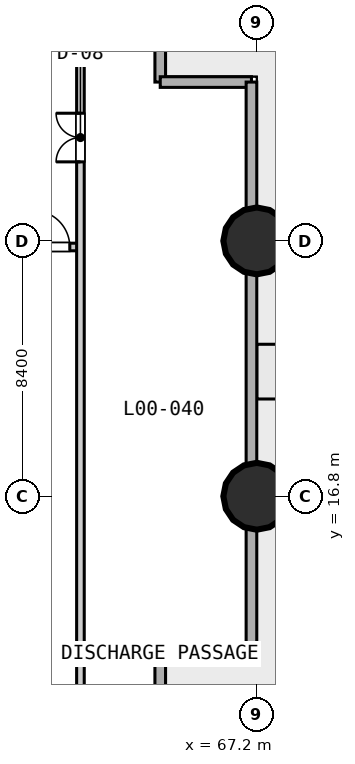
"""IFC4 building model, lengths in metres.
Left out: names, types, materials, properties, quantities, classifications, styles, units other than length and angle.
Written with IfcOpenShell. Run it as: python <this file> out.ifc"""

import sys

from ifc_helpers import new_model, si_unit, direction, frame, frame_2d, origin, origin_2d, place, context, subcontext, project, spatial, rectangle, circle, extrude, element, fill, save


model = new_model("IFC4")
c1 = context("Model", 3, precision=1e-05, world=origin(), true_north=direction((0.0, 1.0)))
c2 = subcontext(c1, "Body", "Model", "MODEL_VIEW")
j1 = project(units=[si_unit("LENGTHUNIT", "METRE"), si_unit("PLANEANGLEUNIT", "RADIAN")], contexts=[c1])
p1 = place(None, origin())
s1 = spatial("IfcSite", under=j1, at=p1, CompositionType="ELEMENT")
p2 = place(p1, origin())
s2 = spatial("IfcBuilding", under=s1, at=p2, CompositionType="ELEMENT")
p3 = place(p2, origin())
s3 = spatial("IfcBuildingStorey", under=s2, at=p3, CompositionType="ELEMENT", Elevation=0.0)
for number, where, z_axis, x_axis in (
    (1, (67.2, 16.8, 0.0), (0.0, 0.0, 1.0), (1.0, 0.0, 0.0)),
    (2, (67.2, 25.2, 0.0), (0.0, 0.0, 1.0), (1.0, 0.0, 0.0)),
):
    element("IfcColumn", number, at=place(p3, frame(where, z_axis=z_axis, x_axis=x_axis)), inside=s3, PredefinedType="USERDEFINED", context=c2, shape_type="SweptSolid", body=[
        extrude(circle(Radius=1.1, at=origin_2d()), origin(), (0.0, 0.0, 1.0), 6.0),
    ])
for number, where, z_axis, x_axis in (
    (3, (64.025, 33.425, 0.0), (0.0, 0.0, 1.0), (0.0, -1.0, 0.0)),
    (4, (64.025, 30.425, 0.0), (0.0, 0.0, 1.0), (1.0, 0.0, 0.0)),
):
    element("IfcWall", number, at=place(p3, frame(where, z_axis=z_axis, x_axis=x_axis)), inside=s3, PredefinedType="STANDARD", context=c2, shape_type="SweptSolid", body=[
        extrude(rectangle(XDim=3.0, YDim=0.35, at=frame_2d((1.5, 0.0))), origin(), (0.0, 0.0, 1.0), 5.65),
    ])
p4 = place(p3, frame((67.025, 30.425, 0.0), z_axis=(0.0, 0.0, 1.0), x_axis=(0.0, -1.0, 0.0)))
e5 = element("IfcWall", 5, at=p4, inside=s3, PredefinedType="STANDARD", context=c2, shape_type="SweptSolid", body=[
    extrude(rectangle(XDim=18.85, YDim=0.35, at=frame_2d((9.425, 0.0))), origin(), (0.0, 0.0, 1.0), 4.8),
])
for number, where, z_axis, x_axis in (
    (6, (67.025, 11.575, 0.0), (0.0, 0.0, 1.0), (-1.0, 0.0, 0.0)),
    (7, (64.025, 11.575, 0.0), (0.0, 0.0, 1.0), (0.0, -1.0, 0.0)),
):
    element("IfcWall", number, at=place(p3, frame(where, z_axis=z_axis, x_axis=x_axis)), inside=s3, PredefinedType="STANDARD", context=c2, shape_type="SweptSolid", body=[
        extrude(rectangle(XDim=3.0, YDim=0.35, at=frame_2d((1.5, 0.0))), origin(), (0.0, 0.0, 1.0), 5.65),
    ])
p5 = place(p3, frame((59.45, 25.0, 0.0), z_axis=(0.0, 0.0, 1.0), x_axis=(1.0, 0.0, 0.0)))
e8 = element("IfcWall", 8, at=p5, inside=s3, PredefinedType="SOLIDWALL", context=c2, shape_type="SweptSolid", body=[
    extrude(rectangle(XDim=2.0, YDim=0.25, at=frame_2d((1.0, 0.0))), origin(), (0.0, 0.0, 1.0), 4.8),
])
p6 = place(p5, frame((0.4, 0.0, 0.0)))
e9 = element("IfcOpeningElement", 9, at=p6, cuts=e8, PredefinedType="OPENING", context=c2, shape_type="SweptSolid", body=[
    extrude(rectangle(XDim=1.2, YDim=2.15, at=frame_2d((0.6, 1.075))), frame((0.0, 0.135, 0.0), z_axis=(0.0, -1.0, 0.0), x_axis=(1.0, 0.0, 0.0)), (0.0, 0.0, 1.0), 0.27),
])
p7 = place(p3, frame((61.4, 8.6, 0.0), z_axis=(0.0, 0.0, 1.0), x_axis=(0.0, 1.0, 0.0)))
e10 = element("IfcWall", 10, at=p7, inside=s3, PredefinedType="SOLIDWALL", context=c2, shape_type="SweptSolid", body=[
    extrude(rectangle(XDim=24.8, YDim=0.25, at=frame_2d((12.4, 0.0))), origin(), (0.0, 0.0, 1.0), 5.65),
])
p8 = place(p7, frame((19.2, 0.0, 0.0)))
e11 = element("IfcOpeningElement", 11, at=p8, cuts=e10, PredefinedType="OPENING", context=c2, shape_type="SweptSolid", body=[
    extrude(rectangle(XDim=1.6, YDim=2.2, at=frame_2d((0.8, 1.1))), frame((0.0, 0.135, 0.0), z_axis=(0.0, -1.0, 0.0), x_axis=(1.0, 0.0, 0.0)), (0.0, 0.0, 1.0), 0.27),
])
p9 = place(p6, origin())
e12 = element("IfcDoor", 12, at=p9, inside=s3, OperationType="SINGLE_SWING_LEFT", PredefinedType="DOOR", context=c2, shape_type="SweptSolid", body=[
    extrude(rectangle(XDim=1.2, YDim=2.15, at=frame_2d((0.6, 1.075))), frame((0.0, 0.025, 0.0), z_axis=(0.0, -1.0, 0.0), x_axis=(1.0, 0.0, 0.0)), (0.0, 0.0, 1.0), 0.05),
])
fill(e9, e12)
p10 = place(p8, origin())
e13 = element("IfcDoor", 13, at=p10, inside=s3, OperationType="SINGLE_SWING_LEFT", PredefinedType="DOOR", context=c2, shape_type="SweptSolid", body=[
    extrude(rectangle(XDim=1.6, YDim=2.2, at=frame_2d((0.8, 1.1))), frame((0.0, 0.025, 0.0), z_axis=(0.0, -1.0, 0.0), x_axis=(1.0, 0.0, 0.0)), (0.0, 0.0, 1.0), 0.05),
])
fill(e11, e13)
save(model, sys.argv[1])
